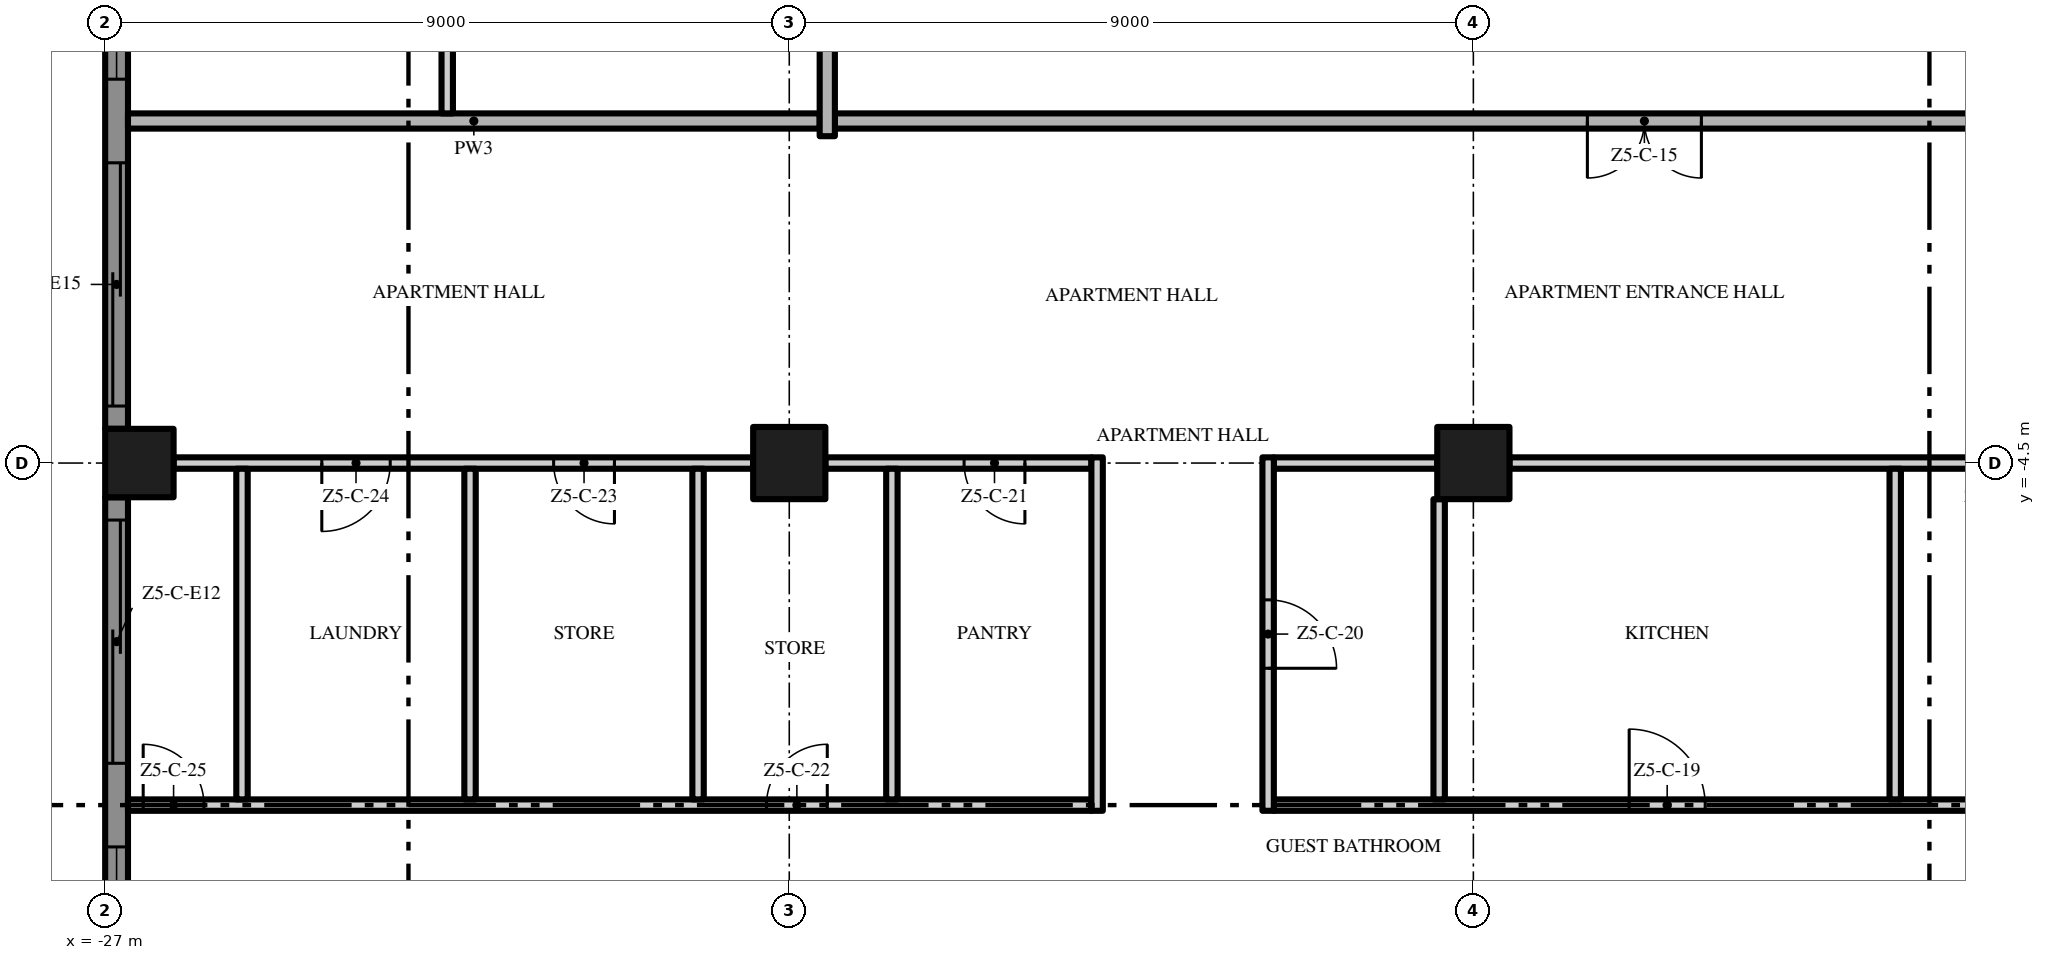
"""IFC4 building model, lengths in metres.
Left out: names, types, materials, properties, quantities, classifications, styles, units other than length and angle.
Written with IfcOpenShell. Run it as: python <this file> out.ifc"""

import sys

from ifc_helpers import new_model, si_unit, direction, frame, frame_2d, origin, origin_2d, place, context, subcontext, project, spatial, polyline, rectangle, outline, extrude, element, fill, save


model = new_model("IFC4")
c1 = context("Model", 3, precision=1e-05, world=origin(), true_north=direction((0.0, 1.0)))
c2 = subcontext(c1, "Body", "Model", "MODEL_VIEW")
j1 = project(units=[si_unit("LENGTHUNIT", "METRE"), si_unit("PLANEANGLEUNIT", "RADIAN")], contexts=[c1])
p1 = place(None, origin())
s1 = spatial("IfcSite", under=j1, at=p1, CompositionType="ELEMENT")
p2 = place(p1, origin())
s2 = spatial("IfcBuilding", under=s1, at=p2, CompositionType="ELEMENT")
p3 = place(p2, frame((0.0, 0.0, 265.4)))
s3 = spatial("IfcBuildingStorey", under=s2, at=p3, CompositionType="ELEMENT", Elevation=265.4)
p4 = place(p3, frame((-18.0, -4.5, 0.0), z_axis=(0.0, 0.0, 1.0), x_axis=(1.0, 0.0, 0.0)))
e1 = element("IfcColumn", 1, at=p4, inside=s3, PredefinedType="COLUMN", context=c2, shape_type="SweptSolid", body=[
    extrude(rectangle(XDim=0.95, YDim=0.95, at=origin_2d()), origin(), (0.0, 0.0, 1.0), 3.5),
])
p5 = place(p3, frame((-26.55, -4.5, 0.0), z_axis=(0.0, 0.0, 1.0), x_axis=(1.0, 0.0, 0.0)))
e2 = element("IfcColumn", 2, at=p5, inside=s3, PredefinedType="COLUMN", context=c2, shape_type="SweptSolid", body=[
    extrude(rectangle(XDim=0.9, YDim=0.9, at=origin_2d()), origin(), (0.0, 0.0, 1.0), 3.5),
])
p6 = place(p3, frame((-9.0, -4.5, 0.0), z_axis=(0.0, 0.0, 1.0), x_axis=(1.0, 0.0, 0.0)))
e3 = element("IfcColumn", 3, at=p6, inside=s3, PredefinedType="COLUMN", context=c2, shape_type="SweptSolid", body=[
    extrude(rectangle(XDim=0.95, YDim=0.95, at=origin_2d()), origin(), (0.0, 0.0, 1.0), 3.5),
])
p7 = place(p3, frame((-26.85, -4.05, 0.0), z_axis=(0.0, 0.0, 1.0), x_axis=(0.0, 1.0, 0.0)))
e4 = element("IfcWall", 4, at=p7, inside=s3, PredefinedType="SOLIDWALL", context=c2, shape_type="SweptSolid", body=[
    extrude(rectangle(XDim=8.1, YDim=0.3, at=frame_2d((4.05, 0.0))), origin(), (0.0, 0.0, 1.0), 3.5),
])
p8 = place(p7, frame((4.6, 0.0, 0.45)))
e5 = element("IfcOpeningElement", 5, at=p8, cuts=e4, PredefinedType="OPENING", context=c2, shape_type="SweptSolid", body=[
    extrude(rectangle(XDim=3.2, YDim=2.65, at=frame_2d((1.6, 1.325))), frame((0.0, 0.16, 0.0), z_axis=(0.0, -1.0, 0.0), x_axis=(1.0, 0.0, 0.0)), (0.0, 0.0, 1.0), 0.32),
])
p9 = place(p7, frame((0.3, 0.0, 0.0)))
e6 = element("IfcOpeningElement", 6, at=p9, cuts=e4, PredefinedType="OPENING", context=c2, shape_type="SweptSolid", body=[
    extrude(rectangle(XDim=3.2, YDim=2.4, at=frame_2d((1.6, 1.2))), frame((0.0, 0.16, 0.0), z_axis=(0.0, -1.0, 0.0), x_axis=(1.0, 0.0, 0.0)), (0.0, 0.0, 1.0), 0.32),
])
p10 = place(p3, frame((-26.85, -13.05, 0.0), z_axis=(0.0, 0.0, 1.0), x_axis=(0.0, 1.0, 0.0)))
e7 = element("IfcWall", 7, at=p10, inside=s3, PredefinedType="SOLIDWALL", context=c2, shape_type="SweptSolid", body=[
    extrude(rectangle(XDim=8.1, YDim=0.3, at=frame_2d((4.05, 0.0))), origin(), (0.0, 0.0, 1.0), 3.5),
])
p11 = place(p10, frame((4.6, 0.0, 0.0)))
e8 = element("IfcOpeningElement", 8, at=p11, cuts=e7, PredefinedType="OPENING", context=c2, shape_type="SweptSolid", body=[
    extrude(rectangle(XDim=3.2, YDim=2.4, at=frame_2d((1.6, 1.2))), frame((0.0, 0.16, 0.0), z_axis=(0.0, -1.0, 0.0), x_axis=(1.0, 0.0, 0.0)), (0.0, 0.0, 1.0), 0.32),
])
p12 = place(p10, frame((0.3, 0.0, 0.45)))
e9 = element("IfcOpeningElement", 9, at=p12, cuts=e7, PredefinedType="OPENING", context=c2, shape_type="SweptSolid", body=[
    extrude(rectangle(XDim=3.2, YDim=2.65, at=frame_2d((1.6, 1.325))), frame((0.0, 0.16, 0.0), z_axis=(0.0, -1.0, 0.0), x_axis=(1.0, 0.0, 0.0)), (0.0, 0.0, 1.0), 0.32),
])
p13 = place(p3, origin())
e10 = element("IfcWall", 10, at=p13, inside=s3, PredefinedType="USERDEFINED", context=c2, shape_type="SweptSolid", body=[
    extrude(outline(polyline([(-27.6, 18.0), (-27.829, 16.5), (-28.429, 15.0), (-29.171, 13.5), (-29.771, 12.0), (-30.0, 10.5), (-29.771, 9.0), (-29.171, 7.5), (-28.429, 6.0), (-27.829, 4.5), (-27.6, 3.0), (-27.829, 1.5), (-28.429, 0.0), (-29.171, -1.5), (-29.771, -3.0), (-30.0, -4.5), (-29.771, -6.0), (-29.171, -7.5), (-28.429, -9.0), (-27.829, -10.5), (-27.6, -12.0), (-27.829, -13.5), (-28.429, -15.0), (-29.171, -16.5), (-29.771, -18.0), (-29.539, -18.093), (-28.942, -16.602), (-28.201, -15.102), (-27.586, -13.566), (-27.347, -12.0), (-27.586, -10.434), (-28.201, -8.898), (-28.942, -7.398), (-29.528, -5.934), (-29.747, -4.5), (-29.528, -3.066), (-28.942, -1.602), (-28.201, -0.102), (-27.586, 1.434), (-27.347, 3.0), (-27.586, 4.566), (-28.201, 6.102), (-28.942, 7.602), (-29.528, 9.066), (-29.747, 10.5), (-29.528, 11.934), (-28.942, 13.398), (-28.201, 14.898), (-27.586, 16.434), (-27.353, 17.962), (-27.6, 18.0)])), origin(), (0.0, 0.0, 1.0), 0.9),
])
p14 = place(p3, frame((-26.7, -9.0, 0.0), z_axis=(0.0, 0.0, 1.0), x_axis=(1.0, 0.0, 0.0)))
e11 = element("IfcWall", 11, at=p14, inside=s3, PredefinedType="PARTITIONING", context=c2, shape_type="SweptSolid", body=[
    extrude(rectangle(XDim=12.675, YDim=0.15, at=frame_2d((6.338, 0.0))), origin(), (0.0, 0.0, 1.0), 3.5),
])
p15 = place(p14, frame((8.4, 0.0, 0.0)))
e12 = element("IfcOpeningElement", 12, at=p15, cuts=e11, PredefinedType="OPENING", context=c2, shape_type="SweptSolid", body=[
    extrude(rectangle(XDim=0.8, YDim=2.0, at=frame_2d((0.4, 1.0))), frame((0.0, 0.085, 0.0), z_axis=(0.0, -1.0, 0.0), x_axis=(1.0, 0.0, 0.0)), (0.0, 0.0, 1.0), 0.17),
])
p16 = place(p14, frame((0.2, 0.0, 0.0)))
e13 = element("IfcOpeningElement", 13, at=p16, cuts=e11, PredefinedType="OPENING", context=c2, shape_type="SweptSolid", body=[
    extrude(rectangle(XDim=0.8, YDim=2.0, at=frame_2d((0.4, 1.0))), frame((0.0, 0.085, 0.0), z_axis=(0.0, -1.0, 0.0), x_axis=(1.0, 0.0, 0.0)), (0.0, 0.0, 1.0), 0.17),
])
p17 = place(p3, frame((-11.625, -9.0, 0.0), z_axis=(0.0, 0.0, 1.0), x_axis=(1.0, 0.0, 0.0)))
e14 = element("IfcWall", 14, at=p17, inside=s3, PredefinedType="PARTITIONING", context=c2, shape_type="SweptSolid", body=[
    extrude(rectangle(XDim=16.025, YDim=0.15, at=frame_2d((8.012, 0.0))), origin(), (0.0, 0.0, 1.0), 3.5),
])
p18 = place(p17, frame((4.675, 0.0, 0.0)))
e15 = element("IfcOpeningElement", 15, at=p18, cuts=e14, PredefinedType="OPENING", context=c2, shape_type="SweptSolid", body=[
    extrude(rectangle(XDim=1.0, YDim=2.4, at=frame_2d((0.5, 1.2))), frame((0.0, 0.085, 0.0), z_axis=(0.0, -1.0, 0.0), x_axis=(1.0, 0.0, 0.0)), (0.0, 0.0, 1.0), 0.17),
])
p19 = place(p3, frame((-18.475, -4.5, 0.0), z_axis=(0.0, 0.0, 1.0), x_axis=(-1.0, 0.0, 0.0)))
e16 = element("IfcWall", 16, at=p19, inside=s3, PredefinedType="PARTITIONING", context=c2, shape_type="SweptSolid", body=[
    extrude(rectangle(XDim=7.625, YDim=0.15, at=frame_2d((3.812, 0.0))), origin(), (0.0, 0.0, 1.0), 3.5),
])
p20 = place(p19, frame((1.825, 0.0, 0.0)))
e17 = element("IfcOpeningElement", 17, at=p20, cuts=e16, PredefinedType="OPENING", context=c2, shape_type="SweptSolid", body=[
    extrude(rectangle(XDim=0.8, YDim=2.0, at=frame_2d((0.4, 1.0))), frame((0.0, 0.085, 0.0), z_axis=(0.0, -1.0, 0.0), x_axis=(1.0, 0.0, 0.0)), (0.0, 0.0, 1.0), 0.17),
])
p21 = place(p19, frame((4.775, 0.0, 0.0)))
e18 = element("IfcOpeningElement", 18, at=p21, cuts=e16, PredefinedType="OPENING", context=c2, shape_type="SweptSolid", body=[
    extrude(rectangle(XDim=0.9, YDim=2.1, at=frame_2d((0.45, 1.05))), frame((0.0, 0.085, 0.0), z_axis=(0.0, -1.0, 0.0), x_axis=(1.0, 0.0, 0.0)), (0.0, 0.0, 1.0), 0.17),
])
p22 = place(p3, frame((-14.025, -4.5, 0.0), z_axis=(0.0, 0.0, 1.0), x_axis=(-1.0, 0.0, 0.0)))
e19 = element("IfcWall", 19, at=p22, inside=s3, PredefinedType="PARTITIONING", context=c2, shape_type="SweptSolid", body=[
    extrude(rectangle(XDim=3.5, YDim=0.15, at=frame_2d((1.75, 0.0))), origin(), (0.0, 0.0, 1.0), 3.5),
])
p23 = place(p22, frame((0.875, 0.0, 0.0)))
e20 = element("IfcOpeningElement", 20, at=p23, cuts=e19, PredefinedType="OPENING", context=c2, shape_type="SweptSolid", body=[
    extrude(rectangle(XDim=0.8, YDim=2.0, at=frame_2d((0.4, 1.0))), frame((0.0, 0.085, 0.0), z_axis=(0.0, -1.0, 0.0), x_axis=(1.0, 0.0, 0.0)), (0.0, 0.0, 1.0), 0.17),
])
p24 = place(p3, frame((-11.625, -4.5, 0.0), z_axis=(0.0, 0.0, 1.0), x_axis=(1.0, 0.0, 0.0)))
e21 = element("IfcWall", 21, at=p24, inside=s3, PredefinedType="PARTITIONING", context=c2, shape_type="SweptSolid", body=[
    extrude(rectangle(XDim=2.15, YDim=0.15, at=frame_2d((1.075, 0.0))), origin(), (0.0, 0.0, 1.0), 3.5),
])
p25 = place(p3, frame((-0.475, -4.5, 0.0), z_axis=(0.0, 0.0, 1.0), x_axis=(-1.0, 0.0, 0.0)))
e22 = element("IfcWall", 22, at=p25, inside=s3, PredefinedType="PARTITIONING", context=c2, shape_type="SweptSolid", body=[
    extrude(rectangle(XDim=8.05, YDim=0.15, at=frame_2d((4.025, 0.0))), origin(), (0.0, 0.0, 1.0), 3.5),
])
p26 = place(p25, frame((1.225, 0.0, 0.0)))
e23 = element("IfcOpeningElement", 23, at=p26, cuts=e22, PredefinedType="OPENING", context=c2, shape_type="SweptSolid", body=[
    extrude(rectangle(XDim=0.8, YDim=2.0, at=frame_2d((0.4, 1.0))), frame((0.0, 0.085, 0.0), z_axis=(0.0, -1.0, 0.0), x_axis=(1.0, 0.0, 0.0)), (0.0, 0.0, 1.0), 0.17),
])
p27 = place(p3, frame((17.4, 0.0, 0.0), z_axis=(0.0, 0.0, 1.0), x_axis=(-1.0, 0.0, 0.0)))
e24 = element("IfcWall", 24, at=p27, inside=s3, PredefinedType="PARTITIONING", context=c2, shape_type="SweptSolid", body=[
    extrude(rectangle(XDim=34.8, YDim=0.2, at=frame_2d((17.4, 0.0))), origin(), (0.0, 0.0, 1.0), 3.5),
])
p28 = place(p27, frame((23.4, 0.0, 0.0)))
e25 = element("IfcOpeningElement", 25, at=p28, cuts=e24, PredefinedType="OPENING", context=c2, shape_type="SweptSolid", body=[
    extrude(rectangle(XDim=1.5, YDim=2.4, at=frame_2d((0.75, 1.2))), frame((0.0, 0.11, 0.0), z_axis=(0.0, -1.0, 0.0), x_axis=(1.0, 0.0, 0.0)), (0.0, 0.0, 1.0), 0.22),
])
p29 = place(p27, frame((5.4, 0.0, 0.0)))
e26 = element("IfcOpeningElement", 26, at=p29, cuts=e24, PredefinedType="OPENING", context=c2, shape_type="SweptSolid", body=[
    extrude(rectangle(XDim=1.5, YDim=2.4, at=frame_2d((0.75, 1.2))), frame((0.0, 0.11, 0.0), z_axis=(0.0, -1.0, 0.0), x_axis=(1.0, 0.0, 0.0)), (0.0, 0.0, 1.0), 0.22),
])
p30 = place(p3, frame((-26.7, 0.0, 0.0), z_axis=(0.0, 0.0, 1.0), x_axis=(1.0, 0.0, 0.0)))
e27 = element("IfcWall", 27, at=p30, inside=s3, PredefinedType="PARTITIONING", context=c2, shape_type="SweptSolid", body=[
    extrude(rectangle(XDim=9.1, YDim=0.2, at=frame_2d((4.55, 0.0))), origin(), (0.0, 0.0, 1.0), 3.5),
])
p31 = place(p3, frame((-25.2, -8.925, 0.0), z_axis=(0.0, 0.0, 1.0), x_axis=(0.0, 1.0, 0.0)))
e28 = element("IfcWall", 28, at=p31, inside=s3, PredefinedType="PARTITIONING", context=c2, shape_type="SweptSolid", body=[
    extrude(rectangle(XDim=4.35, YDim=0.15, at=frame_2d((2.175, 0.0))), origin(), (0.0, 0.0, 1.0), 3.5),
])
p32 = place(p3, frame((-22.5, 0.1, 0.0), z_axis=(0.0, 0.0, 1.0), x_axis=(0.0, 1.0, 0.0)))
e29 = element("IfcWall", 29, at=p32, inside=s3, PredefinedType="PARTITIONING", context=c2, shape_type="SweptSolid", body=[
    extrude(rectangle(XDim=17.45, YDim=0.15, at=frame_2d((8.725, 0.0))), origin(), (0.0, 0.0, 1.0), 3.5),
])
p33 = place(p32, frame((1.65, 0.0, 0.0)))
e30 = element("IfcOpeningElement", 30, at=p33, cuts=e29, PredefinedType="OPENING", context=c2, shape_type="SweptSolid", body=[
    extrude(rectangle(XDim=1.0, YDim=2.4, at=frame_2d((0.5, 1.2))), frame((0.0, 0.085, 0.0), z_axis=(0.0, -1.0, 0.0), x_axis=(1.0, 0.0, 0.0)), (0.0, 0.0, 1.0), 0.17),
])
p34 = place(p32, frame((5.0, 0.0, 0.0)))
e31 = element("IfcOpeningElement", 31, at=p34, cuts=e29, PredefinedType="OPENING", context=c2, shape_type="SweptSolid", body=[
    extrude(rectangle(XDim=1.0, YDim=2.4, at=frame_2d((0.5, 1.2))), frame((0.0, 0.085, 0.0), z_axis=(0.0, -1.0, 0.0), x_axis=(1.0, 0.0, 0.0)), (0.0, 0.0, 1.0), 0.17),
])
p35 = place(p32, frame((13.25, 0.0, 0.0)))
e32 = element("IfcOpeningElement", 32, at=p35, cuts=e29, PredefinedType="OPENING", context=c2, shape_type="SweptSolid", body=[
    extrude(rectangle(XDim=1.8, YDim=2.4, at=frame_2d((0.9, 1.2))), frame((0.0, 0.085, 0.0), z_axis=(0.0, -1.0, 0.0), x_axis=(1.0, 0.0, 0.0)), (0.0, 0.0, 1.0), 0.17),
])
for number, where, z_axis, x_axis in (
    (33, (-22.2, -8.925, 0.0), (0.0, 0.0, 1.0), (0.0, 1.0, 0.0)),
    (34, (-19.2, -8.925, 0.0), (0.0, 0.0, 1.0), (0.0, 1.0, 0.0)),
):
    element("IfcWall", number, at=place(p3, frame(where, z_axis=z_axis, x_axis=x_axis)), inside=s3, PredefinedType="PARTITIONING", context=c2, shape_type="SweptSolid", body=[
        extrude(rectangle(XDim=4.35, YDim=0.15, at=frame_2d((2.175, 0.0))), origin(), (0.0, 0.0, 1.0), 3.5),
    ])
p36 = place(p3, frame((-17.5, -0.2, 0.0), z_axis=(0.0, 0.0, 1.0), x_axis=(0.0, 1.0, 0.0)))
e35 = element("IfcWall", 35, at=p36, inside=s3, PredefinedType="PARTITIONING", context=c2, shape_type="SweptSolid", body=[
    extrude(rectangle(XDim=4.225, YDim=0.2, at=frame_2d((2.112, 0.0))), origin(), (0.0, 0.0, 1.0), 3.5),
])
p37 = place(p3, frame((-16.65, -8.925, 0.0), z_axis=(0.0, 0.0, 1.0), x_axis=(0.0, 1.0, 0.0)))
e36 = element("IfcWall", 36, at=p37, inside=s3, PredefinedType="PARTITIONING", context=c2, shape_type="SweptSolid", body=[
    extrude(rectangle(XDim=4.35, YDim=0.15, at=frame_2d((2.175, 0.0))), origin(), (0.0, 0.0, 1.0), 3.5),
])
p38 = place(p3, frame((-13.95, -9.075, 0.0), z_axis=(0.0, 0.0, 1.0), x_axis=(0.0, 1.0, 0.0)))
e37 = element("IfcWall", 37, at=p38, inside=s3, PredefinedType="PARTITIONING", context=c2, shape_type="SweptSolid", body=[
    extrude(rectangle(XDim=4.65, YDim=0.15, at=frame_2d((2.325, 0.0))), origin(), (0.0, 0.0, 1.0), 3.5),
])
p39 = place(p3, frame((-11.7, -4.425, 0.0), z_axis=(0.0, 0.0, 1.0), x_axis=(0.0, -1.0, 0.0)))
e38 = element("IfcWall", 38, at=p39, inside=s3, PredefinedType="PARTITIONING", context=c2, shape_type="SweptSolid", body=[
    extrude(rectangle(XDim=4.65, YDim=0.15, at=frame_2d((2.325, 0.0))), origin(), (0.0, 0.0, 1.0), 3.5),
])
p40 = place(p39, frame((1.875, 0.0, 0.0)))
e39 = element("IfcOpeningElement", 39, at=p40, cuts=e38, PredefinedType="OPENING", context=c2, shape_type="SweptSolid", body=[
    extrude(rectangle(XDim=0.9, YDim=2.1, at=frame_2d((0.45, 1.05))), frame((0.0, 0.085, 0.0), z_axis=(0.0, -1.0, 0.0), x_axis=(1.0, 0.0, 0.0)), (0.0, 0.0, 1.0), 0.17),
])
p41 = place(p3, frame((-9.45, -8.925, 0.0), z_axis=(0.0, 0.0, 1.0), x_axis=(0.0, 1.0, 0.0)))
e40 = element("IfcWall", 40, at=p41, inside=s3, PredefinedType="PARTITIONING", context=c2, shape_type="SweptSolid", body=[
    extrude(rectangle(XDim=3.95, YDim=0.15, at=frame_2d((1.975, 0.0))), origin(), (0.0, 0.0, 1.0), 3.5),
])
p42 = place(p3, frame((-3.45, -8.925, 0.0), z_axis=(0.0, 0.0, 1.0), x_axis=(0.0, 1.0, 0.0)))
e41 = element("IfcWall", 41, at=p42, inside=s3, PredefinedType="PARTITIONING", context=c2, shape_type="SweptSolid", body=[
    extrude(rectangle(XDim=4.35, YDim=0.15, at=frame_2d((2.175, 0.0))), origin(), (0.0, 0.0, 1.0), 3.5),
])
p43 = place(p8, origin())
e42 = element("IfcWindow", 42, at=p43, inside=s3, PartitioningType="SINGLE_PANEL", PredefinedType="WINDOW", context=c2, shape_type="SweptSolid", body=[
    extrude(rectangle(XDim=3.2, YDim=2.65, at=frame_2d((1.6, 1.325))), frame((0.0, 0.03, 0.0), z_axis=(0.0, -1.0, 0.0), x_axis=(1.0, 0.0, 0.0)), (0.0, 0.0, 1.0), 0.06),
])
fill(e5, e42)
p44 = place(p9, origin())
e43 = element("IfcDoor", 43, at=p44, inside=s3, OperationType="SINGLE_SWING_LEFT", PredefinedType="DOOR", context=c2, shape_type="SweptSolid", body=[
    extrude(rectangle(XDim=3.2, YDim=2.4, at=frame_2d((1.6, 1.2))), frame((0.0, 0.025, 0.0), z_axis=(0.0, -1.0, 0.0), x_axis=(1.0, 0.0, 0.0)), (0.0, 0.0, 1.0), 0.05),
])
fill(e6, e43)
p45 = place(p11, origin())
e44 = element("IfcDoor", 44, at=p45, inside=s3, OperationType="SINGLE_SWING_LEFT", PredefinedType="DOOR", context=c2, shape_type="SweptSolid", body=[
    extrude(rectangle(XDim=3.2, YDim=2.4, at=frame_2d((1.6, 1.2))), frame((0.0, 0.025, 0.0), z_axis=(0.0, -1.0, 0.0), x_axis=(1.0, 0.0, 0.0)), (0.0, 0.0, 1.0), 0.05),
])
fill(e8, e44)
p46 = place(p12, origin())
e45 = element("IfcWindow", 45, at=p46, inside=s3, PartitioningType="SINGLE_PANEL", PredefinedType="WINDOW", context=c2, shape_type="SweptSolid", body=[
    extrude(rectangle(XDim=3.2, YDim=2.65, at=frame_2d((1.6, 1.325))), frame((0.0, 0.03, 0.0), z_axis=(0.0, -1.0, 0.0), x_axis=(1.0, 0.0, 0.0)), (0.0, 0.0, 1.0), 0.06),
])
fill(e9, e45)
p47 = place(p28, origin())
e46 = element("IfcDoor", 46, at=p47, inside=s3, OperationType="DOUBLE_DOOR_SINGLE_SWING", PredefinedType="DOOR", context=c2, shape_type="SweptSolid", body=[
    extrude(rectangle(XDim=1.5, YDim=2.4, at=frame_2d((0.75, 1.2))), frame((0.0, 0.025, 0.0), z_axis=(0.0, -1.0, 0.0), x_axis=(1.0, 0.0, 0.0)), (0.0, 0.0, 1.0), 0.05),
])
fill(e25, e46)
p48 = place(p18, origin())
e47 = element("IfcDoor", 47, at=p48, inside=s3, OperationType="SINGLE_SWING_LEFT", PredefinedType="DOOR", context=c2, shape_type="SweptSolid", body=[
    extrude(rectangle(XDim=1.0, YDim=2.4, at=frame_2d((0.5, 1.2))), frame((0.0, 0.025, 0.0), z_axis=(0.0, -1.0, 0.0), x_axis=(1.0, 0.0, 0.0)), (0.0, 0.0, 1.0), 0.05),
])
fill(e15, e47)
p49 = place(p40, origin())
e48 = element("IfcDoor", 48, at=p49, inside=s3, OperationType="SINGLE_SWING_RIGHT", PredefinedType="DOOR", context=c2, shape_type="SweptSolid", body=[
    extrude(rectangle(XDim=0.9, YDim=2.1, at=frame_2d((0.45, 1.05))), frame((0.0, 0.025, 0.0), z_axis=(0.0, -1.0, 0.0), x_axis=(1.0, 0.0, 0.0)), (0.0, 0.0, 1.0), 0.05),
])
fill(e39, e48)
p50 = place(p23, origin())
e49 = element("IfcDoor", 49, at=p50, inside=s3, OperationType="SINGLE_SWING_LEFT", PredefinedType="DOOR", context=c2, shape_type="SweptSolid", body=[
    extrude(rectangle(XDim=0.8, YDim=2.0, at=frame_2d((0.4, 1.0))), frame((0.0, 0.025, 0.0), z_axis=(0.0, -1.0, 0.0), x_axis=(1.0, 0.0, 0.0)), (0.0, 0.0, 1.0), 0.05),
])
fill(e20, e49)
p51 = place(p15, origin())
e50 = element("IfcDoor", 50, at=p51, inside=s3, OperationType="SINGLE_SWING_RIGHT", PredefinedType="DOOR", context=c2, shape_type="SweptSolid", body=[
    extrude(rectangle(XDim=0.8, YDim=2.0, at=frame_2d((0.4, 1.0))), frame((0.0, 0.025, 0.0), z_axis=(0.0, -1.0, 0.0), x_axis=(1.0, 0.0, 0.0)), (0.0, 0.0, 1.0), 0.05),
])
fill(e12, e50)
p52 = place(p20, origin())
e51 = element("IfcDoor", 51, at=p52, inside=s3, OperationType="SINGLE_SWING_LEFT", PredefinedType="DOOR", context=c2, shape_type="SweptSolid", body=[
    extrude(rectangle(XDim=0.8, YDim=2.0, at=frame_2d((0.4, 1.0))), frame((0.0, 0.025, 0.0), z_axis=(0.0, -1.0, 0.0), x_axis=(1.0, 0.0, 0.0)), (0.0, 0.0, 1.0), 0.05),
])
fill(e17, e51)
p53 = place(p21, origin())
e52 = element("IfcDoor", 52, at=p53, inside=s3, OperationType="SINGLE_SWING_RIGHT", PredefinedType="DOOR", context=c2, shape_type="SweptSolid", body=[
    extrude(rectangle(XDim=0.9, YDim=2.1, at=frame_2d((0.45, 1.05))), frame((0.0, 0.025, 0.0), z_axis=(0.0, -1.0, 0.0), x_axis=(1.0, 0.0, 0.0)), (0.0, 0.0, 1.0), 0.05),
])
fill(e18, e52)
p54 = place(p16, origin())
e53 = element("IfcDoor", 53, at=p54, inside=s3, OperationType="SINGLE_SWING_LEFT", PredefinedType="DOOR", context=c2, shape_type="SweptSolid", body=[
    extrude(rectangle(XDim=0.8, YDim=2.0, at=frame_2d((0.4, 1.0))), frame((0.0, 0.025, 0.0), z_axis=(0.0, -1.0, 0.0), x_axis=(1.0, 0.0, 0.0)), (0.0, 0.0, 1.0), 0.05),
])
fill(e13, e53)
save(model, sys.argv[1])
